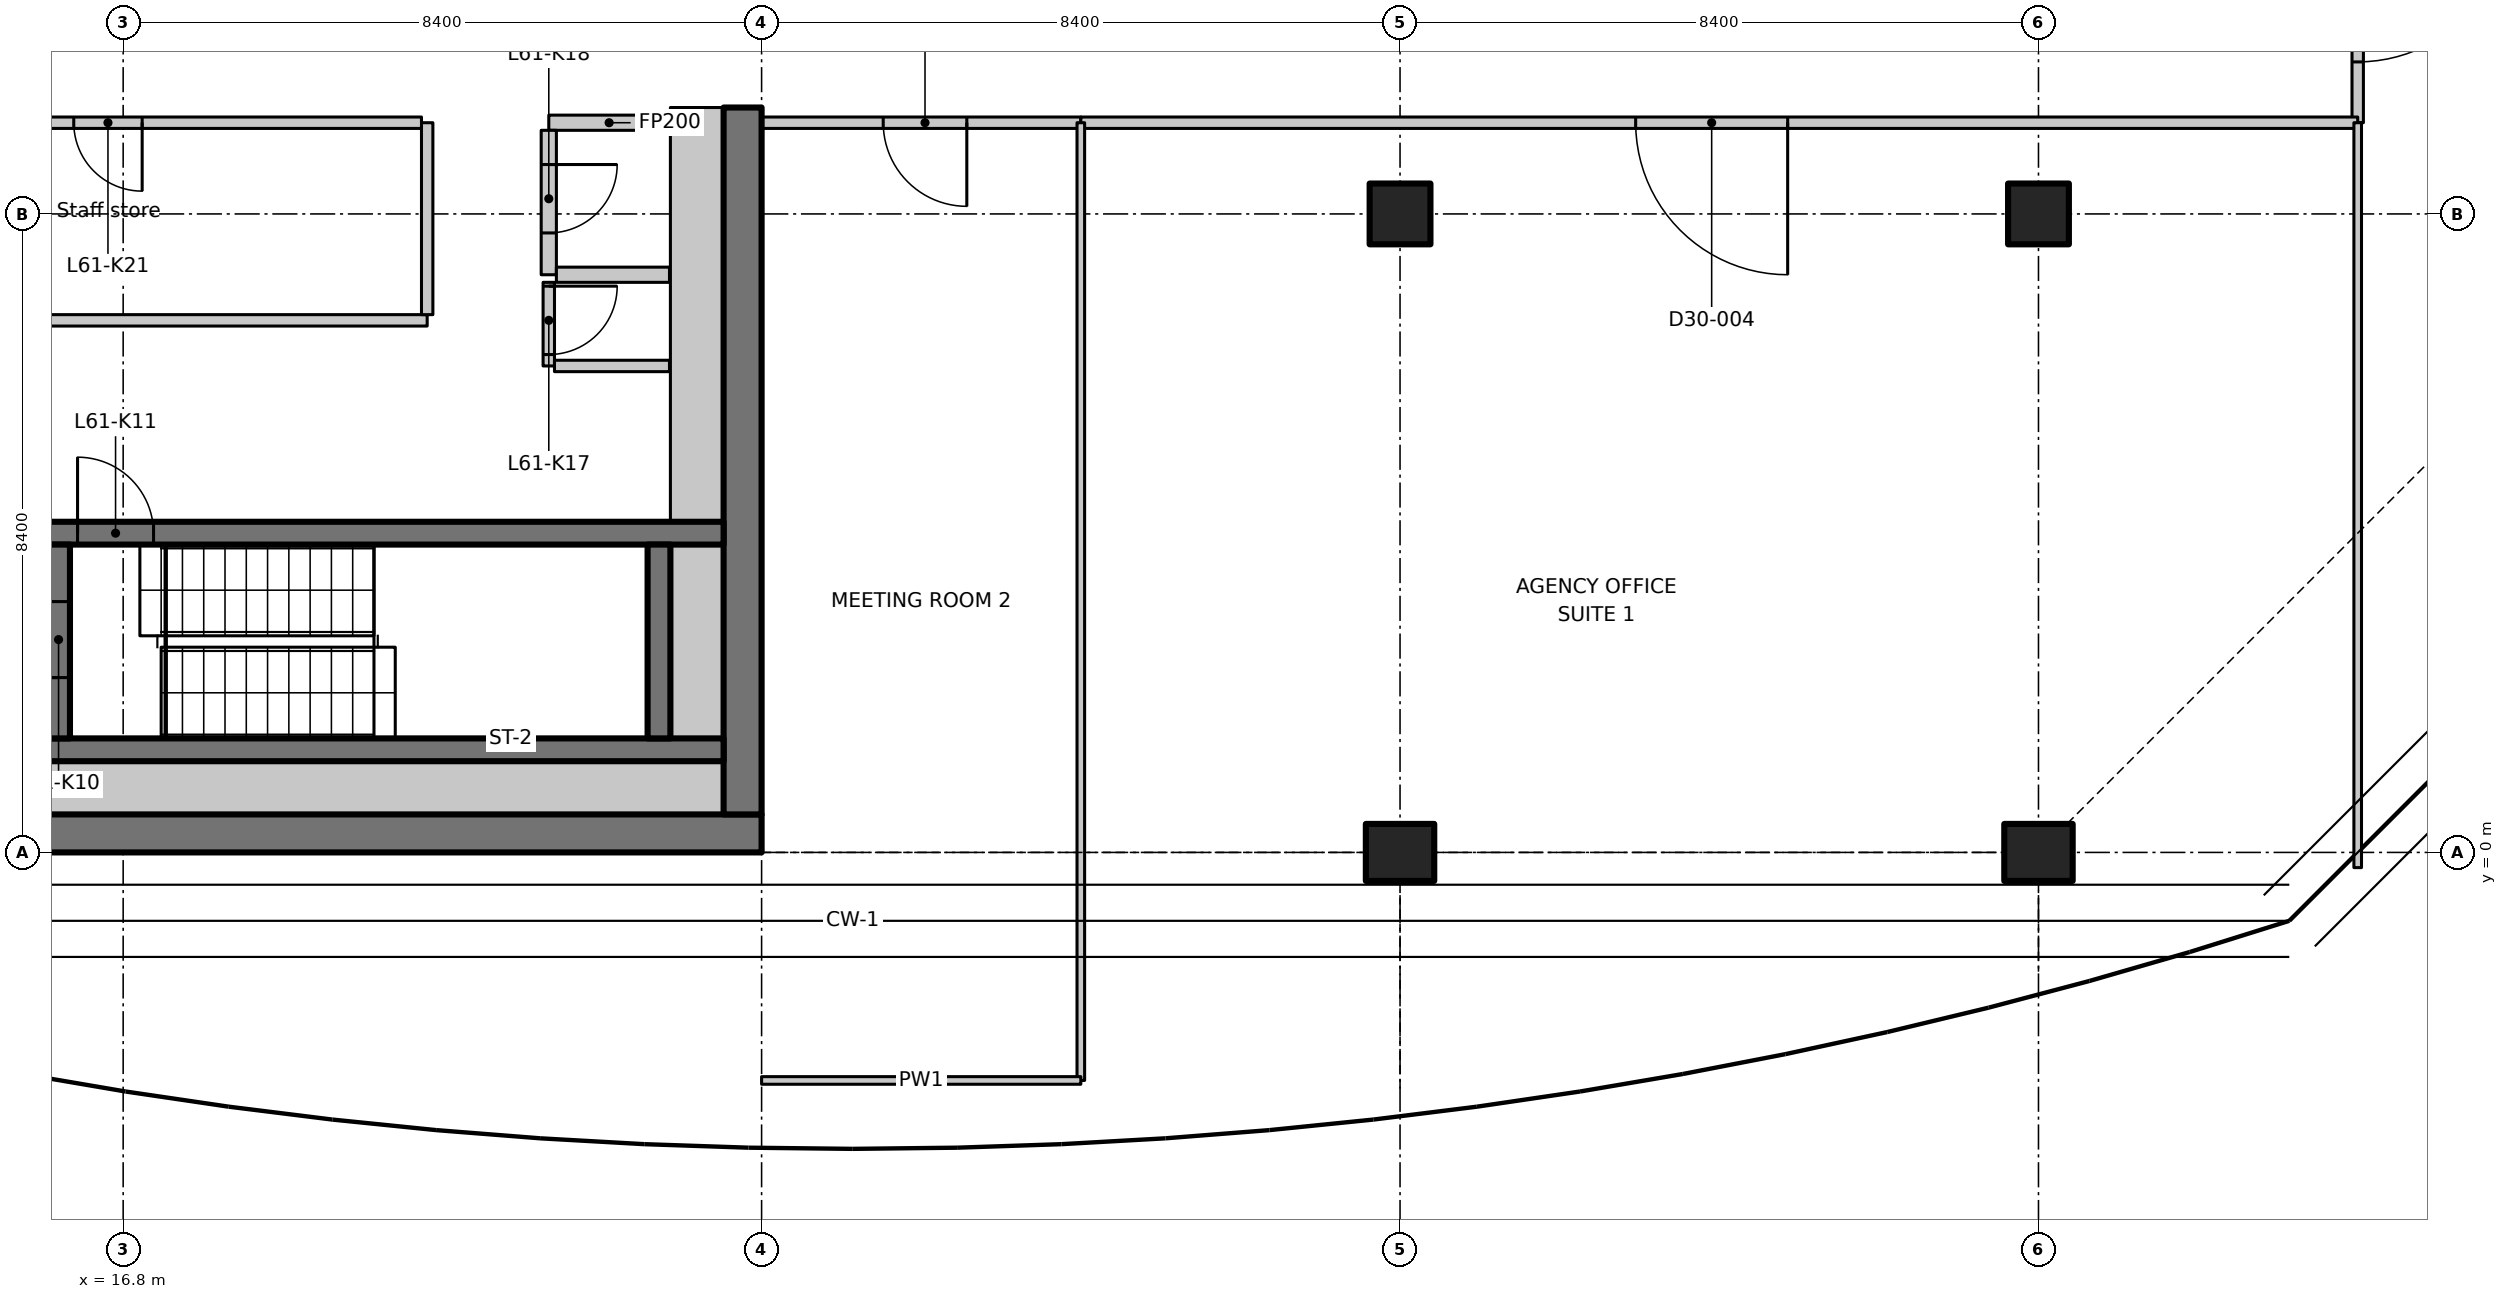
"""IFC4 building model, lengths in metres.
Left out: names, types, materials, properties, quantities, classifications, styles, units other than length and angle.
Written with IfcOpenShell. Run it as: python <this file> out.ifc"""

import sys

from ifc_helpers import new_model, si_unit, direction, frame, frame_2d, origin, origin_2d, place, context, subcontext, project, spatial, polyline, rectangle, outline, extrude, element, fill, save


model = new_model("IFC4")
c1 = context("Model", 3, precision=1e-05, world=origin(), true_north=direction((0.0, 1.0)))
c2 = subcontext(c1, "Body", "Model", "MODEL_VIEW")
j1 = project(units=[si_unit("LENGTHUNIT", "METRE"), si_unit("PLANEANGLEUNIT", "RADIAN")], contexts=[c1])
p1 = place(None, origin())
s1 = spatial("IfcSite", under=j1, at=p1, CompositionType="ELEMENT")
p2 = place(p1, origin())
s2 = spatial("IfcBuilding", under=s1, at=p2, CompositionType="ELEMENT")
p3 = place(p2, frame((0.0, 0.0, 240.9)))
s3 = spatial("IfcBuildingStorey", under=s2, at=p3, CompositionType="ELEMENT", Elevation=240.9)
p4 = place(p3, frame((33.6, 0.0, 0.0), z_axis=(0.0, 0.0, 1.0), x_axis=(0.0, 1.0, 0.0)))
e1 = element("IfcColumn", 1, at=p4, inside=s3, PredefinedType="COLUMN", context=c2, shape_type="SweptSolid", body=[
    extrude(rectangle(XDim=0.75, YDim=0.9, at=origin_2d()), origin(), (0.0, 0.0, 1.0), 3.35),
])
p5 = place(p3, frame((33.6, 8.4, 0.0), z_axis=(0.0, 0.0, 1.0), x_axis=(1.0, 0.0, 0.0)))
e2 = element("IfcColumn", 2, at=p5, inside=s3, PredefinedType="COLUMN", context=c2, shape_type="SweptSolid", body=[
    extrude(rectangle(XDim=0.8, YDim=0.8, at=origin_2d()), origin(), (0.0, 0.0, 1.0), 3.35),
])
p6 = place(p3, frame((42.0, 0.0, 0.0), z_axis=(0.0, 0.0, 1.0), x_axis=(0.0, 1.0, 0.0)))
e3 = element("IfcColumn", 3, at=p6, inside=s3, PredefinedType="COLUMN", context=c2, shape_type="SweptSolid", body=[
    extrude(rectangle(XDim=0.75, YDim=0.9, at=origin_2d()), origin(), (0.0, 0.0, 1.0), 3.35),
])
p7 = place(p3, frame((42.0, 8.4, 0.0), z_axis=(0.0, 0.0, 1.0), x_axis=(1.0, 0.0, 0.0)))
e4 = element("IfcColumn", 4, at=p7, inside=s3, PredefinedType="COLUMN", context=c2, shape_type="SweptSolid", body=[
    extrude(rectangle(XDim=0.8, YDim=0.8, at=origin_2d()), origin(), (0.0, 0.0, 1.0), 3.35),
])
p8 = place(p3, frame((7.436, 0.25, 0.0), z_axis=(0.0, 0.0, 1.0), x_axis=(1.0, 0.0, 0.0)))
e5 = element("IfcWall", 5, at=p8, inside=s3, PredefinedType="SHEAR", context=c2, shape_type="SweptSolid", body=[
    extrude(rectangle(XDim=17.764, YDim=0.5, at=frame_2d((8.882, 0.0))), origin(), (0.0, 0.0, 1.0), 3.35),
])
p9 = place(p3, frame((24.95, 0.5, 0.0), z_axis=(0.0, 0.0, 1.0), x_axis=(0.0, 1.0, 0.0)))
e6 = element("IfcWall", 6, at=p9, inside=s3, PredefinedType="SHEAR", context=c2, shape_type="SweptSolid", body=[
    extrude(rectangle(XDim=9.3, YDim=0.5, at=frame_2d((4.65, 0.0))), origin(), (0.0, 0.0, 1.0), 3.35),
])
p10 = place(p3, frame((15.8, 1.35, 0.0), z_axis=(0.0, 0.0, 1.0), x_axis=(1.0, 0.0, 0.0)))
e7 = element("IfcWall", 7, at=p10, inside=s3, PredefinedType="SHEAR", context=c2, shape_type="SweptSolid", body=[
    extrude(rectangle(XDim=8.9, YDim=0.3, at=frame_2d((4.45, 0.0))), origin(), (0.0, 0.0, 1.0), 3.35),
])
p11 = place(p3, frame((15.8, 4.2, 0.0), z_axis=(0.0, 0.0, 1.0), x_axis=(1.0, 0.0, 0.0)))
e8 = element("IfcWall", 8, at=p11, inside=s3, PredefinedType="SHEAR", context=c2, shape_type="SweptSolid", body=[
    extrude(rectangle(XDim=8.9, YDim=0.3, at=frame_2d((4.45, 0.0))), origin(), (0.0, 0.0, 1.0), 3.35),
])
p12 = place(p11, frame((0.4, 0.0, 0.0)))
e9 = element("IfcOpeningElement", 9, at=p12, cuts=e8, PredefinedType="OPENING", context=c2, shape_type="SweptSolid", body=[
    extrude(rectangle(XDim=1.0, YDim=2.1, at=frame_2d((0.5, 1.05))), frame((0.0, 0.16, 0.0), z_axis=(0.0, -1.0, 0.0), x_axis=(1.0, 0.0, 0.0)), (0.0, 0.0, 1.0), 0.32),
])
p13 = place(p3, frame((15.95, 1.5, 0.0), z_axis=(0.0, 0.0, 1.0), x_axis=(0.0, 1.0, 0.0)))
e10 = element("IfcWall", 10, at=p13, inside=s3, PredefinedType="SHEAR", context=c2, shape_type="SweptSolid", body=[
    extrude(rectangle(XDim=2.55, YDim=0.3, at=frame_2d((1.275, 0.0))), origin(), (0.0, 0.0, 1.0), 3.35),
])
p14 = place(p13, frame((0.8, 0.0, 0.0)))
e11 = element("IfcOpeningElement", 11, at=p14, cuts=e10, PredefinedType="OPENING", context=c2, shape_type="SweptSolid", body=[
    extrude(rectangle(XDim=1.0, YDim=2.1, at=frame_2d((0.5, 1.05))), frame((0.0, 0.16, 0.0), z_axis=(0.0, -1.0, 0.0), x_axis=(1.0, 0.0, 0.0)), (0.0, 0.0, 1.0), 0.32),
])
p15 = place(p3, frame((23.85, 1.5, 0.0), z_axis=(0.0, 0.0, 1.0), x_axis=(0.0, 1.0, 0.0)))
e12 = element("IfcWall", 12, at=p15, inside=s3, PredefinedType="SHEAR", context=c2, shape_type="SweptSolid", body=[
    extrude(rectangle(XDim=2.55, YDim=0.3, at=frame_2d((1.275, 0.0))), origin(), (0.0, 0.0, 1.0), 3.35),
])
p16 = place(p3, frame((23.988, 9.6, 0.0), z_axis=(0.0, 0.0, 1.0), x_axis=(-1.0, 0.0, 0.0)))
e13 = element("IfcWall", 13, at=p16, inside=s3, PredefinedType="PARTITIONING", context=c2, shape_type="SweptSolid", body=[
    extrude(rectangle(XDim=1.588, YDim=0.2, at=frame_2d((0.794, 0.0))), origin(), (0.0, 0.0, 1.0), 3.35),
])
p17 = place(p3, frame((22.4, 9.5, 0.0), z_axis=(0.0, 0.0, 1.0), x_axis=(0.0, -1.0, 0.0)))
e14 = element("IfcWall", 14, at=p17, inside=s3, PredefinedType="PARTITIONING", context=c2, shape_type="SweptSolid", body=[
    extrude(rectangle(XDim=1.9, YDim=0.2, at=frame_2d((0.95, 0.0))), origin(), (0.0, 0.0, 1.0), 3.35),
])
p18 = place(p17, frame((0.45, 0.0, 0.0)))
e15 = element("IfcOpeningElement", 15, at=p18, cuts=e14, PredefinedType="OPENING", context=c2, shape_type="SweptSolid", body=[
    extrude(rectangle(XDim=0.9, YDim=2.1, at=frame_2d((0.45, 1.05))), frame((0.0, 0.11, 0.0), z_axis=(0.0, -1.0, 0.0), x_axis=(1.0, 0.0, 0.0)), (0.0, 0.0, 1.0), 0.22),
])
p19 = place(p3, frame((22.5, 7.6, 0.0), z_axis=(0.0, 0.0, 1.0), x_axis=(1.0, 0.0, 0.0)))
e16 = element("IfcWall", 16, at=p19, inside=s3, PredefinedType="PARTITIONING", context=c2, shape_type="SweptSolid", body=[
    extrude(rectangle(XDim=1.488, YDim=0.2, at=frame_2d((0.744, 0.0))), origin(), (0.0, 0.0, 1.0), 3.35),
])
p20 = place(p3, frame((12.5, 7.0, 0.0), z_axis=(0.0, 0.0, 1.0), x_axis=(1.0, 0.0, 0.0)))
e17 = element("IfcWall", 17, at=p20, inside=s3, PredefinedType="PARTITIONING", context=c2, shape_type="SweptSolid", body=[
    extrude(rectangle(XDim=8.3, YDim=0.15, at=frame_2d((4.15, 0.0))), origin(), (0.0, 0.0, 1.0), 3.35),
])
p21 = place(p3, frame((20.8, 7.075, 0.0), z_axis=(0.0, 0.0, 1.0), x_axis=(0.0, 1.0, 0.0)))
e18 = element("IfcWall", 18, at=p21, inside=s3, PredefinedType="PARTITIONING", context=c2, shape_type="SweptSolid", body=[
    extrude(rectangle(XDim=2.525, YDim=0.15, at=frame_2d((1.263, 0.0))), origin(), (0.0, 0.0, 1.0), 3.35),
])
p22 = place(p3, frame((20.725, 9.6, 0.0), z_axis=(0.0, 0.0, 1.0), x_axis=(-1.0, 0.0, 0.0)))
e19 = element("IfcWall", 19, at=p22, inside=s3, PredefinedType="PARTITIONING", context=c2, shape_type="SweptSolid", body=[
    extrude(rectangle(XDim=8.225, YDim=0.15, at=frame_2d((4.113, 0.0))), origin(), (0.0, 0.0, 1.0), 3.35),
])
p23 = place(p22, frame((3.675, 0.0, 0.0)))
e20 = element("IfcOpeningElement", 20, at=p23, cuts=e19, PredefinedType="OPENING", context=c2, shape_type="SweptSolid", body=[
    extrude(rectangle(XDim=0.9, YDim=2.1, at=frame_2d((0.45, 1.05))), frame((0.0, 0.085, 0.0), z_axis=(0.0, -1.0, 0.0), x_axis=(1.0, 0.0, 0.0)), (0.0, 0.0, 1.0), 0.17),
])
p24 = place(p3, frame((22.4, 7.5, 0.0), z_axis=(0.0, 0.0, 1.0), x_axis=(0.0, -1.0, 0.0)))
e21 = element("IfcWall", 21, at=p24, inside=s3, PredefinedType="PARTITIONING", context=c2, shape_type="SweptSolid", body=[
    extrude(rectangle(XDim=1.1, YDim=0.15, at=frame_2d((0.55, 0.0))), origin(), (0.0, 0.0, 1.0), 3.35),
])
p25 = place(p24, frame((0.05, 0.0, 0.0)))
e22 = element("IfcOpeningElement", 22, at=p25, cuts=e21, PredefinedType="OPENING", context=c2, shape_type="SweptSolid", body=[
    extrude(rectangle(XDim=0.9, YDim=2.1, at=frame_2d((0.45, 1.05))), frame((0.0, 0.085, 0.0), z_axis=(0.0, -1.0, 0.0), x_axis=(1.0, 0.0, 0.0)), (0.0, 0.0, 1.0), 0.17),
])
p26 = place(p3, frame((22.475, 6.4, 0.0), z_axis=(0.0, 0.0, 1.0), x_axis=(1.0, 0.0, 0.0)))
e23 = element("IfcWall", 23, at=p26, inside=s3, PredefinedType="PARTITIONING", context=c2, shape_type="SweptSolid", body=[
    extrude(rectangle(XDim=1.513, YDim=0.15, at=frame_2d((0.756, 0.0))), origin(), (0.0, 0.0, 1.0), 3.35),
])
p27 = place(p3, frame((13.35, 0.85, 0.0), z_axis=(0.0, 0.0, 1.0), x_axis=(1.0, 0.0, 0.0)))
e24 = element("IfcWall", 24, at=p27, inside=s3, PredefinedType="PARTITIONING", context=c2, shape_type="SweptSolid", body=[
    extrude(rectangle(XDim=11.35, YDim=0.7, at=frame_2d((5.675, 0.0))), origin(), (0.0, 0.0, 1.0), 3.35),
])
p28 = place(p3, frame((24.35, 1.5, 0.0), z_axis=(0.0, 0.0, 1.0), x_axis=(0.0, 1.0, 0.0)))
e25 = element("IfcWall", 25, at=p28, inside=s3, PredefinedType="PARTITIONING", context=c2, shape_type="SweptSolid", body=[
    extrude(rectangle(XDim=2.55, YDim=0.7, at=frame_2d((1.275, 0.0))), origin(), (0.0, 0.0, 1.0), 3.35),
])
p29 = place(p3, frame((24.35, 4.35, 0.0), z_axis=(0.0, 0.0, 1.0), x_axis=(0.0, 1.0, 0.0)))
e26 = element("IfcWall", 26, at=p29, inside=s3, PredefinedType="PARTITIONING", context=c2, shape_type="SweptSolid", body=[
    extrude(rectangle(XDim=5.45, YDim=0.7, at=frame_2d((2.725, 0.0))), origin(), (0.0, 0.0, 1.0), 3.35),
])
p30 = place(p3, frame((29.4, 9.6, 0.0), z_axis=(0.0, 0.0, 1.0), x_axis=(-1.0, 0.0, 0.0)))
e27 = element("IfcWall", 27, at=p30, inside=s3, PredefinedType="PARTITIONING", context=c2, shape_type="SweptSolid", body=[
    extrude(rectangle(XDim=4.2, YDim=0.15, at=frame_2d((2.1, 0.0))), origin(), (0.0, 0.0, 1.0), 3.33),
])
p31 = place(p30, frame((1.5, 0.0, 0.0)))
e28 = element("IfcOpeningElement", 28, at=p31, cuts=e27, PredefinedType="OPENING", context=c2, shape_type="SweptSolid", body=[
    extrude(rectangle(XDim=1.1, YDim=2.1, at=frame_2d((0.55, 1.05))), frame((0.0, 0.085, 0.0), z_axis=(0.0, -1.0, 0.0), x_axis=(1.0, 0.0, 0.0)), (0.0, 0.0, 1.0), 0.17),
])
p32 = place(p3, frame((46.2, 13.0, 0.0), z_axis=(0.0, 0.0, 1.0), x_axis=(0.0, -1.0, 0.0)))
e29 = element("IfcWall", 29, at=p32, inside=s3, PredefinedType="PARTITIONING", context=c2, shape_type="SweptSolid", body=[
    extrude(rectangle(XDim=3.4, YDim=0.15, at=frame_2d((1.7, 0.0))), origin(), (0.0, 0.0, 1.0), 3.33),
])
p33 = place(p32, frame((0.6, 0.0, 0.0)))
e30 = element("IfcOpeningElement", 30, at=p33, cuts=e29, PredefinedType="OPENING", context=c2, shape_type="SweptSolid", body=[
    extrude(rectangle(XDim=2.0, YDim=2.4, at=frame_2d((1.0, 1.2))), frame((0.0, 0.085, 0.0), z_axis=(0.0, -1.0, 0.0), x_axis=(1.0, 0.0, 0.0)), (0.0, 0.0, 1.0), 0.17),
])
p34 = place(p3, frame((46.2, 9.6, 0.0), z_axis=(0.0, 0.0, 1.0), x_axis=(-1.0, 0.0, 0.0)))
e31 = element("IfcWall", 31, at=p34, inside=s3, PredefinedType="PARTITIONING", context=c2, shape_type="SweptSolid", body=[
    extrude(rectangle(XDim=16.8, YDim=0.15, at=frame_2d((8.4, 0.0))), origin(), (0.0, 0.0, 1.0), 3.33),
])
p35 = place(p34, frame((7.5, 0.0, 0.0)))
e32 = element("IfcOpeningElement", 32, at=p35, cuts=e31, PredefinedType="OPENING", context=c2, shape_type="SweptSolid", body=[
    extrude(rectangle(XDim=2.0, YDim=2.4, at=frame_2d((1.0, 1.2))), frame((0.0, 0.085, 0.0), z_axis=(0.0, -1.0, 0.0), x_axis=(1.0, 0.0, 0.0)), (0.0, 0.0, 1.0), 0.17),
])
p36 = place(p3, frame((46.2, -0.2, 0.0), z_axis=(0.0, 0.0, 1.0), x_axis=(0.0, 1.0, 0.0)))
e33 = element("IfcWall", 33, at=p36, inside=s3, PredefinedType="PARTITIONING", context=c2, shape_type="SweptSolid", body=[
    extrude(outline(polyline([(0.0, 0.0), (9.8, 0.0), (9.8, 3.33), (5.066, 3.33), (5.064, 2.98), (3.736, 2.98), (3.734, 3.33), (0.0, 3.33), (0.0, 0.0)])), frame((0.0, 0.05, 0.0), z_axis=(0.0, -1.0, 0.0), x_axis=(1.0, 0.0, 0.0)), (0.0, 0.0, 1.0), 0.1),
])
p37 = place(p3, frame((29.4, 9.6, 0.0), z_axis=(0.0, 0.0, 1.0), x_axis=(0.0, -1.0, 0.0)))
e34 = element("IfcWall", 34, at=p37, inside=s3, PredefinedType="PARTITIONING", context=c2, shape_type="SweptSolid", body=[
    extrude(outline(polyline([(0.0, 0.0), (12.6, 0.0), (12.6, 3.33), (10.05, 3.33), (10.048, 2.98), (9.152, 2.98), (9.15, 3.33), (0.0, 3.33), (0.0, 0.0)])), frame((0.0, 0.05, 0.0), z_axis=(0.0, -1.0, 0.0), x_axis=(1.0, 0.0, 0.0)), (0.0, 0.0, 1.0), 0.1),
])
p38 = place(p3, frame((29.4, -3.0, 0.0), z_axis=(0.0, 0.0, 1.0), x_axis=(-1.0, 0.0, 0.0)))
e35 = element("IfcWall", 35, at=p38, inside=s3, PredefinedType="PARTITIONING", context=c2, shape_type="SweptSolid", body=[
    extrude(rectangle(XDim=4.2, YDim=0.1, at=frame_2d((2.1, 0.0))), origin(), (0.0, 0.0, 1.0), 3.33),
])
p39 = place(p14, origin())
e36 = element("IfcDoor", 36, at=p39, inside=s3, OperationType="SINGLE_SWING_LEFT", PredefinedType="DOOR", context=c2, shape_type="SweptSolid", body=[
    extrude(rectangle(XDim=1.0, YDim=2.1, at=frame_2d((0.5, 1.05))), frame((0.0, 0.025, 0.0), z_axis=(0.0, -1.0, 0.0), x_axis=(1.0, 0.0, 0.0)), (0.0, 0.0, 1.0), 0.05),
])
fill(e11, e36)
p40 = place(p12, origin())
e37 = element("IfcDoor", 37, at=p40, inside=s3, OperationType="SINGLE_SWING_RIGHT", PredefinedType="DOOR", context=c2, shape_type="SweptSolid", body=[
    extrude(rectangle(XDim=1.0, YDim=2.1, at=frame_2d((0.5, 1.05))), frame((0.0, 0.025, 0.0), z_axis=(0.0, -1.0, 0.0), x_axis=(1.0, 0.0, 0.0)), (0.0, 0.0, 1.0), 0.05),
])
fill(e9, e37)
p41 = place(p25, origin())
e38 = element("IfcDoor", 38, at=p41, inside=s3, OperationType="SINGLE_SWING_RIGHT", PredefinedType="DOOR", context=c2, shape_type="SweptSolid", body=[
    extrude(rectangle(XDim=0.9, YDim=2.1, at=frame_2d((0.45, 1.05))), frame((0.0, 0.025, 0.0), z_axis=(0.0, -1.0, 0.0), x_axis=(1.0, 0.0, 0.0)), (0.0, 0.0, 1.0), 0.05),
])
fill(e22, e38)
p42 = place(p18, origin())
e39 = element("IfcDoor", 39, at=p42, inside=s3, OperationType="SINGLE_SWING_LEFT", PredefinedType="DOOR", context=c2, shape_type="SweptSolid", body=[
    extrude(rectangle(XDim=0.9, YDim=2.1, at=frame_2d((0.45, 1.05))), frame((0.0, 0.025, 0.0), z_axis=(0.0, -1.0, 0.0), x_axis=(1.0, 0.0, 0.0)), (0.0, 0.0, 1.0), 0.05),
])
fill(e15, e39)
p43 = place(p23, origin())
e40 = element("IfcDoor", 40, at=p43, inside=s3, OperationType="SINGLE_SWING_RIGHT", PredefinedType="DOOR", context=c2, shape_type="SweptSolid", body=[
    extrude(rectangle(XDim=0.9, YDim=2.1, at=frame_2d((0.45, 1.05))), frame((0.0, 0.025, 0.0), z_axis=(0.0, -1.0, 0.0), x_axis=(1.0, 0.0, 0.0)), (0.0, 0.0, 1.0), 0.05),
])
fill(e20, e40)
p44 = place(p33, origin())
e41 = element("IfcDoor", 41, at=p44, inside=s3, OperationType="DOUBLE_DOOR_SINGLE_SWING", PredefinedType="DOOR", context=c2, shape_type="SweptSolid", body=[
    extrude(rectangle(XDim=2.0, YDim=2.4, at=frame_2d((1.0, 1.2))), frame((0.0, 0.025, 0.0), z_axis=(0.0, -1.0, 0.0), x_axis=(1.0, 0.0, 0.0)), (0.0, 0.0, 1.0), 0.05),
])
fill(e30, e41)
p45 = place(p31, origin())
e42 = element("IfcDoor", 42, at=p45, inside=s3, OperationType="SINGLE_SWING_LEFT", PredefinedType="DOOR", context=c2, shape_type="SweptSolid", body=[
    extrude(rectangle(XDim=1.1, YDim=2.1, at=frame_2d((0.55, 1.05))), frame((0.0, 0.025, 0.0), z_axis=(0.0, -1.0, 0.0), x_axis=(1.0, 0.0, 0.0)), (0.0, 0.0, 1.0), 0.05),
])
fill(e28, e42)
p46 = place(p35, origin())
e43 = element("IfcDoor", 43, at=p46, inside=s3, OperationType="DOUBLE_DOOR_SINGLE_SWING", PredefinedType="DOOR", context=c2, shape_type="SweptSolid", body=[
    extrude(rectangle(XDim=2.0, YDim=2.4, at=frame_2d((1.0, 1.2))), frame((0.0, 0.025, 0.0), z_axis=(0.0, -1.0, 0.0), x_axis=(1.0, 0.0, 0.0)), (0.0, 0.0, 1.0), 0.05),
])
fill(e32, e43)
save(model, sys.argv[1])
